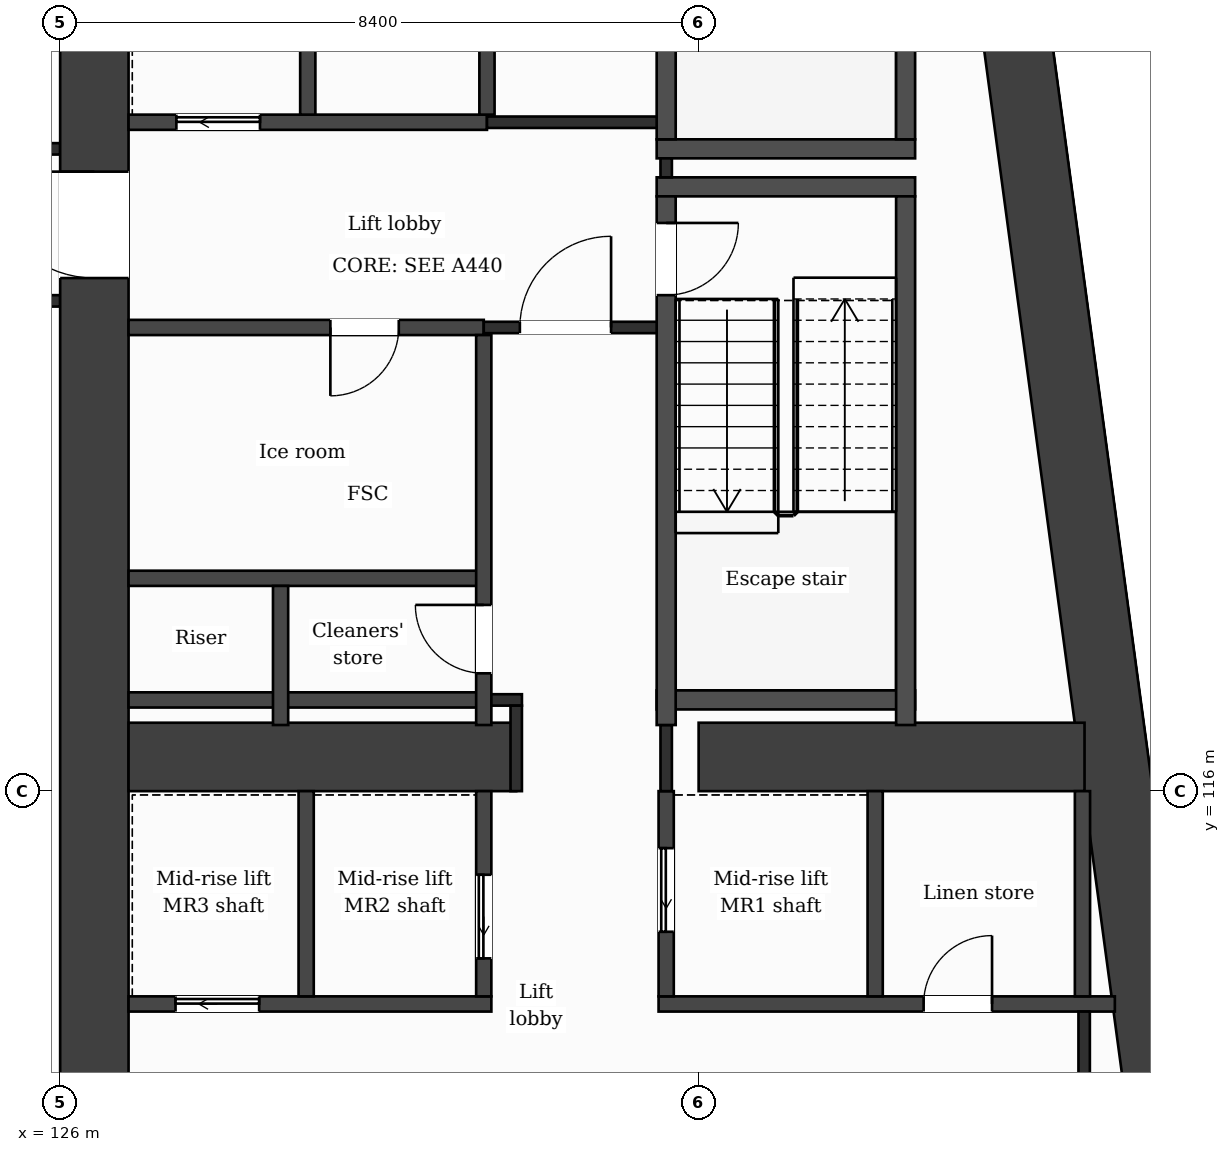
"""IFC4 building model, lengths in metres.
Left out: names, types, materials, properties, quantities, classifications, styles, units other than length and angle.
Written with IfcOpenShell. Run it as: python <this file> out.ifc"""

import sys

from ifc_helpers import new_model, si_unit, direction, frame, frame_2d, origin, place, context, subcontext, project, spatial, rectangle, extrude, element, fill, save


model = new_model("IFC4")
c1 = context("Model", 3, precision=1e-05, world=origin(), true_north=direction((0.0, 1.0)))
c2 = subcontext(c1, "Body", "Model", "MODEL_VIEW")
j1 = project(units=[si_unit("LENGTHUNIT", "METRE"), si_unit("PLANEANGLEUNIT", "RADIAN")], contexts=[c1])
p1 = place(None, origin())
s1 = spatial("IfcSite", under=j1, at=p1, CompositionType="ELEMENT")
p2 = place(p1, origin())
s2 = spatial("IfcBuilding", under=s1, at=p2, CompositionType="ELEMENT")
p3 = place(p2, frame((0.0, 0.0, 166.3)))
s3 = spatial("IfcBuildingStorey", under=s2, at=p3, CompositionType="ELEMENT", Elevation=166.3)
p4 = place(p3, frame((137.776, 131.95, 0.0), z_axis=(0.0, 0.0, 1.0), x_axis=(0.133421759112, -0.991059349482, 0.0)))
e1 = element("IfcWall", 1, at=p4, inside=s3, PredefinedType="SHEAR", context=c2, shape_type="SweptSolid", body=[
    extrude(rectangle(XDim=21.29, YDim=0.9, at=frame_2d((10.645, 0.0))), origin(), (0.0, 0.0, 1.0), 3.7),
])
p5 = place(p3, frame((126.45, 110.85, 0.0), z_axis=(0.0, 0.0, 1.0), x_axis=(0.0, 1.0, 0.0)))
e2 = element("IfcWall", 2, at=p5, inside=s3, PredefinedType="SHEAR", context=c2, shape_type="SweptSolid", body=[
    extrude(rectangle(XDim=21.1, YDim=0.9, at=frame_2d((10.55, 0.0))), origin(), (0.0, 0.0, 1.0), 3.7),
])
p6 = place(p5, frame((11.9, 0.0, 0.0)))
e3 = element("IfcOpeningElement", 3, at=p6, cuts=e2, PredefinedType="OPENING", context=c2, shape_type="SweptSolid", body=[
    extrude(rectangle(XDim=1.4, YDim=2.1, at=frame_2d((0.7, 1.05))), frame((0.0, 0.46, 0.0), z_axis=(0.0, -1.0, 0.0), x_axis=(1.0, 0.0, 0.0)), (0.0, 0.0, 1.0), 0.92),
])
p7 = place(p3, frame((126.9, 116.45, 0.0), z_axis=(0.0, 0.0, 1.0), x_axis=(1.0, 0.0, 0.0)))
e4 = element("IfcWall", 4, at=p7, inside=s3, PredefinedType="SHEAR", context=c2, shape_type="SweptSolid", body=[
    extrude(rectangle(XDim=5.1, YDim=0.9, at=frame_2d((2.55, 0.0))), origin(), (0.0, 0.0, 1.0), 3.7),
])
p8 = place(p3, frame((134.4, 116.45, 0.0), z_axis=(0.0, 0.0, 1.0), x_axis=(1.0, 0.0, 0.0)))
e5 = element("IfcWall", 5, at=p8, inside=s3, PredefinedType="SHEAR", context=c2, shape_type="SweptSolid", body=[
    extrude(rectangle(XDim=5.077, YDim=0.9, at=frame_2d((2.539, 0.0))), origin(), (0.0, 0.0, 1.0), 3.7),
])
p9 = place(p3, frame((126.9, 113.2, 0.0), z_axis=(0.0, 0.0, 1.0), x_axis=(1.0, 0.0, 0.0)))
e6 = element("IfcWall", 6, at=p9, inside=s3, PredefinedType="PARTITIONING", context=c2, shape_type="SweptSolid", body=[
    extrude(rectangle(XDim=4.773, YDim=0.2, at=frame_2d((2.387, 0.0))), origin(), (0.0, 0.0, 1.0), 3.38),
])
p10 = place(p9, frame((0.618, 0.0, 0.0)))
e7 = element("IfcOpeningElement", 7, at=p10, cuts=e6, PredefinedType="OPENING", context=c2, shape_type="SweptSolid", body=[
    extrude(rectangle(XDim=1.1, YDim=2.1, at=frame_2d((0.55, 1.05))), frame((0.0, 0.11, 0.0), z_axis=(0.0, -1.0, 0.0), x_axis=(1.0, 0.0, 0.0)), (0.0, 0.0, 1.0), 0.22),
])
p11 = place(p3, frame((133.873, 113.2, 0.0), z_axis=(0.0, 0.0, 1.0), x_axis=(1.0, 0.0, 0.0)))
e8 = element("IfcWall", 8, at=p11, inside=s3, PredefinedType="PARTITIONING", context=c2, shape_type="SweptSolid", body=[
    extrude(rectangle(XDim=6.003, YDim=0.2, at=frame_2d((3.001, 0.0))), origin(), (0.0, 0.0, 1.0), 3.38),
])
p12 = place(p11, frame((3.487, 0.0, 0.0)))
e9 = element("IfcOpeningElement", 9, at=p12, cuts=e8, PredefinedType="OPENING", context=c2, shape_type="SweptSolid", body=[
    extrude(rectangle(XDim=0.9, YDim=2.1, at=frame_2d((0.45, 1.05))), frame((0.0, 0.11, 0.0), z_axis=(0.0, -1.0, 0.0), x_axis=(1.0, 0.0, 0.0)), (0.0, 0.0, 1.0), 0.22),
])
p13 = place(p3, frame((126.9, 117.2, 0.0), z_axis=(0.0, 0.0, 1.0), x_axis=(1.0, 0.0, 0.0)))
e10 = element("IfcWall", 10, at=p13, inside=s3, PredefinedType="PARTITIONING", context=c2, shape_type="SweptSolid", body=[
    extrude(rectangle(XDim=4.673, YDim=0.2, at=frame_2d((2.336, 0.0))), origin(), (0.0, 0.0, 1.0), 3.38),
])
p14 = place(p3, frame((131.573, 117.2, 0.0), z_axis=(0.0, 0.0, 1.0), x_axis=(1.0, 0.0, 0.0)))
e11 = element("IfcWall", 11, at=p14, inside=s3, PredefinedType="PARTITIONING", context=c2, shape_type="SweptSolid", body=[
    extrude(rectangle(XDim=0.502, YDim=0.15, at=frame_2d((0.251, 0.0))), origin(), (0.0, 0.0, 1.0), 3.38),
])
p15 = place(p3, frame((133.848, 117.2, 0.0), z_axis=(0.0, 0.0, 1.0), x_axis=(1.0, 0.0, 0.0)))
e12 = element("IfcWall", 12, at=p15, inside=s3, PredefinedType="PARTITIONING", context=c2, shape_type="SweptSolid", body=[
    extrude(rectangle(XDim=3.4, YDim=0.25, at=frame_2d((1.7, 0.0))), origin(), (0.0, 0.0, 1.0), 3.38),
])
p16 = place(p3, frame((126.9, 118.8, 0.0), z_axis=(0.0, 0.0, 1.0), x_axis=(1.0, 0.0, 0.0)))
e13 = element("IfcWall", 13, at=p16, inside=s3, PredefinedType="PARTITIONING", context=c2, shape_type="SweptSolid", body=[
    extrude(rectangle(XDim=4.673, YDim=0.2, at=frame_2d((2.336, 0.0))), origin(), (0.0, 0.0, 1.0), 3.38),
])
p17 = place(p3, frame((126.9, 122.1, 0.0), z_axis=(0.0, 0.0, 1.0), x_axis=(1.0, 0.0, 0.0)))
e14 = element("IfcWall", 14, at=p17, inside=s3, PredefinedType="PARTITIONING", context=c2, shape_type="SweptSolid", body=[
    extrude(rectangle(XDim=4.673, YDim=0.2, at=frame_2d((2.336, 0.0))), origin(), (0.0, 0.0, 1.0), 3.38),
])
p18 = place(p17, frame((2.655, 0.0, 0.0)))
e15 = element("IfcOpeningElement", 15, at=p18, cuts=e14, PredefinedType="OPENING", context=c2, shape_type="SweptSolid", body=[
    extrude(rectangle(XDim=0.9, YDim=2.1, at=frame_2d((0.45, 1.05))), frame((0.0, 0.11, 0.0), z_axis=(0.0, -1.0, 0.0), x_axis=(1.0, 0.0, 0.0)), (0.0, 0.0, 1.0), 0.22),
])
p19 = place(p3, frame((131.573, 122.1, 0.0), z_axis=(0.0, 0.0, 1.0), x_axis=(1.0, 0.0, 0.0)))
e16 = element("IfcWall", 16, at=p19, inside=s3, PredefinedType="PARTITIONING", context=c2, shape_type="SweptSolid", body=[
    extrude(rectangle(XDim=2.4, YDim=0.15, at=frame_2d((1.2, 0.0))), origin(), (0.0, 0.0, 1.0), 3.38),
])
p20 = place(p19, frame((0.475, 0.0, 0.0)))
e17 = element("IfcOpeningElement", 17, at=p20, cuts=e16, PredefinedType="OPENING", context=c2, shape_type="SweptSolid", body=[
    extrude(rectangle(XDim=1.2, YDim=2.1, at=frame_2d((0.6, 1.05))), frame((0.0, 0.085, 0.0), z_axis=(0.0, -1.0, 0.0), x_axis=(1.0, 0.0, 0.0)), (0.0, 0.0, 1.0), 0.17),
])
p21 = place(p3, frame((100.8, 122.45, 0.0), z_axis=(0.0, 0.0, 1.0), x_axis=(1.0, 0.0, 0.0)))
e18 = element("IfcWall", 18, at=p21, inside=s3, PredefinedType="PARTITIONING", context=c2, shape_type="SweptSolid", body=[
    extrude(rectangle(XDim=25.2, YDim=0.15, at=frame_2d((12.6, 0.0))), origin(), (0.0, 0.0, 1.0), 3.38),
])
for number, where, z_axis, x_axis in (
    (19, (133.848, 123.95, 0.0), (0.0, 0.0, 1.0), (1.0, 0.0, 0.0)),
    (20, (133.848, 124.45, 0.0), (0.0, 0.0, 1.0), (1.0, 0.0, 0.0)),
):
    element("IfcWall", number, at=place(p3, frame(where, z_axis=z_axis, x_axis=x_axis)), inside=s3, PredefinedType="PARTITIONING", context=c2, shape_type="SweptSolid", body=[
        extrude(rectangle(XDim=3.4, YDim=0.25, at=frame_2d((1.7, 0.0))), origin(), (0.0, 0.0, 1.0), 3.38),
    ])
p22 = place(p3, frame((100.8, 124.45, 0.0), z_axis=(0.0, 0.0, 1.0), x_axis=(1.0, 0.0, 0.0)))
e21 = element("IfcWall", 21, at=p22, inside=s3, PredefinedType="PARTITIONING", context=c2, shape_type="SweptSolid", body=[
    extrude(rectangle(XDim=25.2, YDim=0.15, at=frame_2d((12.6, 0.0))), origin(), (0.0, 0.0, 1.0), 3.38),
])
p23 = place(p22, frame((4.275, 0.0, 0.0)))
e22 = element("IfcOpeningElement", 22, at=p23, cuts=e21, PredefinedType="OPENING", context=c2, shape_type="SweptSolid", body=[
    extrude(rectangle(XDim=1.0, YDim=2.1, at=frame_2d((0.5, 1.05))), frame((0.0, 0.085, 0.0), z_axis=(0.0, -1.0, 0.0), x_axis=(1.0, 0.0, 0.0)), (0.0, 0.0, 1.0), 0.17),
])
p24 = place(p22, frame((0.675, 0.0, 0.0)))
e23 = element("IfcOpeningElement", 23, at=p24, cuts=e21, PredefinedType="OPENING", context=c2, shape_type="SweptSolid", body=[
    extrude(rectangle(XDim=1.0, YDim=2.1, at=frame_2d((0.5, 1.05))), frame((0.0, 0.085, 0.0), z_axis=(0.0, -1.0, 0.0), x_axis=(1.0, 0.0, 0.0)), (0.0, 0.0, 1.0), 0.17),
])
p25 = place(p22, frame((10.425, 0.0, 0.0)))
e24 = element("IfcOpeningElement", 24, at=p25, cuts=e21, PredefinedType="OPENING", context=c2, shape_type="SweptSolid", body=[
    extrude(rectangle(XDim=1.0, YDim=2.1, at=frame_2d((0.5, 1.05))), frame((0.0, 0.085, 0.0), z_axis=(0.0, -1.0, 0.0), x_axis=(1.0, 0.0, 0.0)), (0.0, 0.0, 1.0), 0.17),
])
p26 = place(p22, frame((22.175, 0.0, 0.0)))
e25 = element("IfcOpeningElement", 25, at=p26, cuts=e21, PredefinedType="OPENING", context=c2, shape_type="SweptSolid", body=[
    extrude(rectangle(XDim=1.0, YDim=2.1, at=frame_2d((0.5, 1.05))), frame((0.0, 0.085, 0.0), z_axis=(0.0, -1.0, 0.0), x_axis=(1.0, 0.0, 0.0)), (0.0, 0.0, 1.0), 0.17),
])
p27 = place(p3, frame((126.9, 124.8, 0.0), z_axis=(0.0, 0.0, 1.0), x_axis=(1.0, 0.0, 0.0)))
e26 = element("IfcWall", 26, at=p27, inside=s3, PredefinedType="PARTITIONING", context=c2, shape_type="SweptSolid", body=[
    extrude(rectangle(XDim=4.715, YDim=0.2, at=frame_2d((2.358, 0.0))), origin(), (0.0, 0.0, 1.0), 3.38),
])
p28 = place(p27, frame((0.629, 0.0, 0.0)))
e27 = element("IfcOpeningElement", 27, at=p28, cuts=e26, PredefinedType="OPENING", context=c2, shape_type="SweptSolid", body=[
    extrude(rectangle(XDim=1.1, YDim=2.1, at=frame_2d((0.55, 1.05))), frame((0.0, 0.11, 0.0), z_axis=(0.0, -1.0, 0.0), x_axis=(1.0, 0.0, 0.0)), (0.0, 0.0, 1.0), 0.22),
])
p29 = place(p3, frame((131.615, 124.8, 0.0), z_axis=(0.0, 0.0, 1.0), x_axis=(1.0, 0.0, 0.0)))
e28 = element("IfcWall", 28, at=p29, inside=s3, PredefinedType="PARTITIONING", context=c2, shape_type="SweptSolid", body=[
    extrude(rectangle(XDim=2.483, YDim=0.15, at=frame_2d((1.241, 0.0))), origin(), (0.0, 0.0, 1.0), 3.38),
])
p30 = place(p3, frame((128.9, 116.87, 0.0), z_axis=(0.0, 0.0, 1.0), x_axis=(0.0, 1.0, 0.0)))
e29 = element("IfcWall", 29, at=p30, inside=s3, PredefinedType="PARTITIONING", context=c2, shape_type="SweptSolid", body=[
    extrude(rectangle(XDim=1.83, YDim=0.2, at=frame_2d((0.915, 0.0))), origin(), (0.0, 0.0, 1.0), 3.38),
])
p31 = place(p3, frame((129.237, 113.3, 0.0), z_axis=(0.0, 0.0, 1.0), x_axis=(0.0, 1.0, 0.0)))
e30 = element("IfcWall", 30, at=p31, inside=s3, PredefinedType="PARTITIONING", context=c2, shape_type="SweptSolid", body=[
    extrude(rectangle(XDim=2.7, YDim=0.2, at=frame_2d((1.35, 0.0))), origin(), (0.0, 0.0, 1.0), 3.38),
])
p32 = place(p3, frame((129.258, 124.9, 0.0), z_axis=(0.0, 0.0, 1.0), x_axis=(0.0, 1.0, 0.0)))
e31 = element("IfcWall", 31, at=p32, inside=s3, PredefinedType="PARTITIONING", context=c2, shape_type="SweptSolid", body=[
    extrude(rectangle(XDim=3.1, YDim=0.2, at=frame_2d((1.55, 0.0))), origin(), (0.0, 0.0, 1.0), 3.38),
])
p33 = place(p3, frame((131.573, 113.3, 0.0), z_axis=(0.0, 0.0, 1.0), x_axis=(0.0, 1.0, 0.0)))
e32 = element("IfcWall", 32, at=p33, inside=s3, PredefinedType="PARTITIONING", context=c2, shape_type="SweptSolid", body=[
    extrude(rectangle(XDim=2.7, YDim=0.2, at=frame_2d((1.35, 0.0))), origin(), (0.0, 0.0, 1.0), 3.38),
])
p34 = place(p33, frame((0.5, 0.0, 0.0)))
e33 = element("IfcOpeningElement", 33, at=p34, cuts=e32, PredefinedType="OPENING", context=c2, shape_type="SweptSolid", body=[
    extrude(rectangle(XDim=1.1, YDim=2.1, at=frame_2d((0.55, 1.05))), frame((0.0, 0.11, 0.0), z_axis=(0.0, -1.0, 0.0), x_axis=(1.0, 0.0, 0.0)), (0.0, 0.0, 1.0), 0.22),
])
p35 = place(p3, frame((131.573, 116.87, 0.0), z_axis=(0.0, 0.0, 1.0), x_axis=(0.0, 1.0, 0.0)))
e34 = element("IfcWall", 34, at=p35, inside=s3, PredefinedType="PARTITIONING", context=c2, shape_type="SweptSolid", body=[
    extrude(rectangle(XDim=5.13, YDim=0.2, at=frame_2d((2.565, 0.0))), origin(), (0.0, 0.0, 1.0), 3.38),
])
p36 = place(p35, frame((0.68, 0.0, 0.0)))
e35 = element("IfcOpeningElement", 35, at=p36, cuts=e34, PredefinedType="OPENING", context=c2, shape_type="SweptSolid", body=[
    extrude(rectangle(XDim=0.9, YDim=2.1, at=frame_2d((0.45, 1.05))), frame((0.0, 0.11, 0.0), z_axis=(0.0, -1.0, 0.0), x_axis=(1.0, 0.0, 0.0)), (0.0, 0.0, 1.0), 0.22),
])
p37 = place(p3, frame((131.615, 124.9, 0.0), z_axis=(0.0, 0.0, 1.0), x_axis=(0.0, 1.0, 0.0)))
e36 = element("IfcWall", 36, at=p37, inside=s3, PredefinedType="PARTITIONING", context=c2, shape_type="SweptSolid", body=[
    extrude(rectangle(XDim=3.1, YDim=0.2, at=frame_2d((1.55, 0.0))), origin(), (0.0, 0.0, 1.0), 3.38),
])
p38 = place(p3, frame((132.0, 116.0, 0.0), z_axis=(0.0, 0.0, 1.0), x_axis=(0.0, 1.0, 0.0)))
e37 = element("IfcWall", 37, at=p38, inside=s3, PredefinedType="PARTITIONING", context=c2, shape_type="SweptSolid", body=[
    extrude(rectangle(XDim=1.125, YDim=0.15, at=frame_2d((0.562, 0.0))), origin(), (0.0, 0.0, 1.0), 3.38),
])
p39 = place(p3, frame((133.973, 113.3, 0.0), z_axis=(0.0, 0.0, 1.0), x_axis=(0.0, 1.0, 0.0)))
e38 = element("IfcWall", 38, at=p39, inside=s3, PredefinedType="PARTITIONING", context=c2, shape_type="SweptSolid", body=[
    extrude(rectangle(XDim=2.7, YDim=0.2, at=frame_2d((1.35, 0.0))), origin(), (0.0, 0.0, 1.0), 3.38),
])
p40 = place(p39, frame((0.85, 0.0, 0.0)))
e39 = element("IfcOpeningElement", 39, at=p40, cuts=e38, PredefinedType="OPENING", context=c2, shape_type="SweptSolid", body=[
    extrude(rectangle(XDim=1.1, YDim=2.1, at=frame_2d((0.55, 1.05))), frame((0.0, 0.11, 0.0), z_axis=(0.0, -1.0, 0.0), x_axis=(1.0, 0.0, 0.0)), (0.0, 0.0, 1.0), 0.22),
])
p41 = place(p3, frame((133.973, 116.0, 0.0), z_axis=(0.0, 0.0, 1.0), x_axis=(0.0, 1.0, 0.0)))
e40 = element("IfcWall", 40, at=p41, inside=s3, PredefinedType="PARTITIONING", context=c2, shape_type="SweptSolid", body=[
    extrude(rectangle(XDim=0.87, YDim=0.15, at=frame_2d((0.435, 0.0))), origin(), (0.0, 0.0, 1.0), 3.38),
])
p42 = place(p3, frame((133.973, 124.075, 0.0), z_axis=(0.0, 0.0, 1.0), x_axis=(0.0, 1.0, 0.0)))
e41 = element("IfcWall", 41, at=p42, inside=s3, PredefinedType="PARTITIONING", context=c2, shape_type="SweptSolid", body=[
    extrude(rectangle(XDim=0.25, YDim=0.15, at=frame_2d((0.125, 0.0))), origin(), (0.0, 0.0, 1.0), 3.38),
])
p43 = place(p3, frame((133.973, 116.87, 0.0), z_axis=(0.0, 0.0, 1.0), x_axis=(0.0, 1.0, 0.0)))
e42 = element("IfcWall", 42, at=p43, inside=s3, PredefinedType="PARTITIONING", context=c2, shape_type="SweptSolid", body=[
    extrude(rectangle(XDim=6.955, YDim=0.25, at=frame_2d((3.478, 0.0))), origin(), (0.0, 0.0, 1.0), 3.38),
])
p44 = place(p43, frame((5.655, 0.0, 0.0)))
e43 = element("IfcOpeningElement", 43, at=p44, cuts=e42, PredefinedType="OPENING", context=c2, shape_type="SweptSolid", body=[
    extrude(rectangle(XDim=0.95, YDim=2.1, at=frame_2d((0.475, 1.05))), frame((0.0, 0.135, 0.0), z_axis=(0.0, -1.0, 0.0), x_axis=(1.0, 0.0, 0.0)), (0.0, 0.0, 1.0), 0.27),
])
p45 = place(p3, frame((133.973, 124.575, 0.0), z_axis=(0.0, 0.0, 1.0), x_axis=(0.0, 1.0, 0.0)))
e44 = element("IfcWall", 44, at=p45, inside=s3, PredefinedType="PARTITIONING", context=c2, shape_type="SweptSolid", body=[
    extrude(rectangle(XDim=6.955, YDim=0.25, at=frame_2d((3.478, 0.0))), origin(), (0.0, 0.0, 1.0), 3.38),
])
p46 = place(p45, frame((5.325, 0.0, 0.0)))
e45 = element("IfcOpeningElement", 45, at=p46, cuts=e44, PredefinedType="OPENING", context=c2, shape_type="SweptSolid", body=[
    extrude(rectangle(XDim=1.0, YDim=2.1, at=frame_2d((0.5, 1.05))), frame((0.0, 0.135, 0.0), z_axis=(0.0, -1.0, 0.0), x_axis=(1.0, 0.0, 0.0)), (0.0, 0.0, 1.0), 0.27),
])
p47 = place(p3, frame((136.722, 113.3, 0.0), z_axis=(0.0, 0.0, 1.0), x_axis=(0.0, 1.0, 0.0)))
e46 = element("IfcWall", 46, at=p47, inside=s3, PredefinedType="PARTITIONING", context=c2, shape_type="SweptSolid", body=[
    extrude(rectangle(XDim=2.7, YDim=0.2, at=frame_2d((1.35, 0.0))), origin(), (0.0, 0.0, 1.0), 3.38),
])
p48 = place(p3, frame((137.123, 116.87, 0.0), z_axis=(0.0, 0.0, 1.0), x_axis=(0.0, 1.0, 0.0)))
e47 = element("IfcWall", 47, at=p48, inside=s3, PredefinedType="PARTITIONING", context=c2, shape_type="SweptSolid", body=[
    extrude(rectangle(XDim=6.955, YDim=0.25, at=frame_2d((3.478, 0.0))), origin(), (0.0, 0.0, 1.0), 3.38),
])
p49 = place(p3, frame((137.123, 124.575, 0.0), z_axis=(0.0, 0.0, 1.0), x_axis=(0.0, 1.0, 0.0)))
e48 = element("IfcWall", 48, at=p49, inside=s3, PredefinedType="PARTITIONING", context=c2, shape_type="SweptSolid", body=[
    extrude(rectangle(XDim=6.955, YDim=0.25, at=frame_2d((3.478, 0.0))), origin(), (0.0, 0.0, 1.0), 3.38),
])
p50 = place(p3, frame((139.45, 113.3, 0.0), z_axis=(0.0, 0.0, 1.0), x_axis=(0.0, 1.0, 0.0)))
e49 = element("IfcWall", 49, at=p50, inside=s3, PredefinedType="PARTITIONING", context=c2, shape_type="SweptSolid", body=[
    extrude(rectangle(XDim=2.7, YDim=0.2, at=frame_2d((1.35, 0.0))), origin(), (0.0, 0.0, 1.0), 3.38),
])
p51 = place(p3, frame((139.472, 111.3, 0.0), z_axis=(0.0, 0.0, 1.0), x_axis=(0.0, 1.0, 0.0)))
e50 = element("IfcWall", 50, at=p51, inside=s3, PredefinedType="PARTITIONING", context=c2, shape_type="SweptSolid", body=[
    extrude(rectangle(XDim=1.8, YDim=0.15, at=frame_2d((0.9, 0.0))), origin(), (0.0, 0.0, 1.0), 3.38),
])
p52 = place(p20, origin())
e51 = element("IfcDoor", 51, at=p52, inside=s3, OperationType="SINGLE_SWING_RIGHT", PredefinedType="DOOR", context=c2, shape_type="SweptSolid", body=[
    extrude(rectangle(XDim=1.2, YDim=2.1, at=frame_2d((0.6, 1.05))), frame((0.0, 0.025, 0.0), z_axis=(0.0, -1.0, 0.0), x_axis=(1.0, 0.0, 0.0)), (0.0, 0.0, 1.0), 0.05),
])
fill(e17, e51)
p53 = place(p28, origin())
e52 = element("IfcDoor", 52, at=p53, inside=s3, OperationType="SLIDING_TO_LEFT", PredefinedType="DOOR", context=c2, shape_type="SweptSolid", body=[
    extrude(rectangle(XDim=1.1, YDim=2.1, at=frame_2d((0.55, 1.05))), frame((0.0, 0.025, 0.0), z_axis=(0.0, -1.0, 0.0), x_axis=(1.0, 0.0, 0.0)), (0.0, 0.0, 1.0), 0.05),
])
fill(e27, e52)
p54 = place(p18, origin())
e53 = element("IfcDoor", 53, at=p54, inside=s3, OperationType="SINGLE_SWING_LEFT", PredefinedType="DOOR", context=c2, shape_type="SweptSolid", body=[
    extrude(rectangle(XDim=0.9, YDim=2.1, at=frame_2d((0.45, 1.05))), frame((0.0, 0.025, 0.0), z_axis=(0.0, -1.0, 0.0), x_axis=(1.0, 0.0, 0.0)), (0.0, 0.0, 1.0), 0.05),
])
fill(e15, e53)
p55 = place(p44, origin())
e54 = element("IfcDoor", 54, at=p55, inside=s3, OperationType="SINGLE_SWING_RIGHT", PredefinedType="DOOR", context=c2, shape_type="SweptSolid", body=[
    extrude(rectangle(XDim=0.95, YDim=2.1, at=frame_2d((0.475, 1.05))), frame((0.0, 0.025, 0.0), z_axis=(0.0, -1.0, 0.0), x_axis=(1.0, 0.0, 0.0)), (0.0, 0.0, 1.0), 0.05),
])
fill(e43, e54)
p56 = place(p36, origin())
e55 = element("IfcDoor", 55, at=p56, inside=s3, OperationType="SINGLE_SWING_RIGHT", PredefinedType="DOOR", context=c2, shape_type="SweptSolid", body=[
    extrude(rectangle(XDim=0.9, YDim=2.1, at=frame_2d((0.45, 1.05))), frame((0.0, 0.025, 0.0), z_axis=(0.0, -1.0, 0.0), x_axis=(1.0, 0.0, 0.0)), (0.0, 0.0, 1.0), 0.05),
])
fill(e35, e55)
p57 = place(p40, origin())
e56 = element("IfcDoor", 56, at=p57, inside=s3, OperationType="SLIDING_TO_LEFT", PredefinedType="DOOR", context=c2, shape_type="SweptSolid", body=[
    extrude(rectangle(XDim=1.1, YDim=2.1, at=frame_2d((0.55, 1.05))), frame((0.0, 0.025, 0.0), z_axis=(0.0, -1.0, 0.0), x_axis=(1.0, 0.0, 0.0)), (0.0, 0.0, 1.0), 0.05),
])
fill(e39, e56)
p58 = place(p34, origin())
e57 = element("IfcDoor", 57, at=p58, inside=s3, OperationType="SLIDING_TO_LEFT", PredefinedType="DOOR", context=c2, shape_type="SweptSolid", body=[
    extrude(rectangle(XDim=1.1, YDim=2.1, at=frame_2d((0.55, 1.05))), frame((0.0, 0.025, 0.0), z_axis=(0.0, -1.0, 0.0), x_axis=(1.0, 0.0, 0.0)), (0.0, 0.0, 1.0), 0.05),
])
fill(e33, e57)
p59 = place(p10, origin())
e58 = element("IfcDoor", 58, at=p59, inside=s3, OperationType="SLIDING_TO_LEFT", PredefinedType="DOOR", context=c2, shape_type="SweptSolid", body=[
    extrude(rectangle(XDim=1.1, YDim=2.1, at=frame_2d((0.55, 1.05))), frame((0.0, 0.025, 0.0), z_axis=(0.0, -1.0, 0.0), x_axis=(1.0, 0.0, 0.0)), (0.0, 0.0, 1.0), 0.05),
])
fill(e7, e58)
p60 = place(p12, origin())
e59 = element("IfcDoor", 59, at=p60, inside=s3, OperationType="SINGLE_SWING_RIGHT", PredefinedType="DOOR", context=c2, shape_type="SweptSolid", body=[
    extrude(rectangle(XDim=0.9, YDim=2.1, at=frame_2d((0.45, 1.05))), frame((0.0, 0.025, 0.0), z_axis=(0.0, -1.0, 0.0), x_axis=(1.0, 0.0, 0.0)), (0.0, 0.0, 1.0), 0.05),
])
fill(e9, e59)
p61 = place(p6, origin())
e60 = element("IfcDoor", 60, at=p61, inside=s3, OperationType="SINGLE_SWING_RIGHT", PredefinedType="DOOR", context=c2, shape_type="SweptSolid", body=[
    extrude(rectangle(XDim=1.4, YDim=2.1, at=frame_2d((0.7, 1.05))), frame((0.0, 0.025, 0.0), z_axis=(0.0, -1.0, 0.0), x_axis=(1.0, 0.0, 0.0)), (0.0, 0.0, 1.0), 0.05),
])
fill(e3, e60)
save(model, sys.argv[1])
